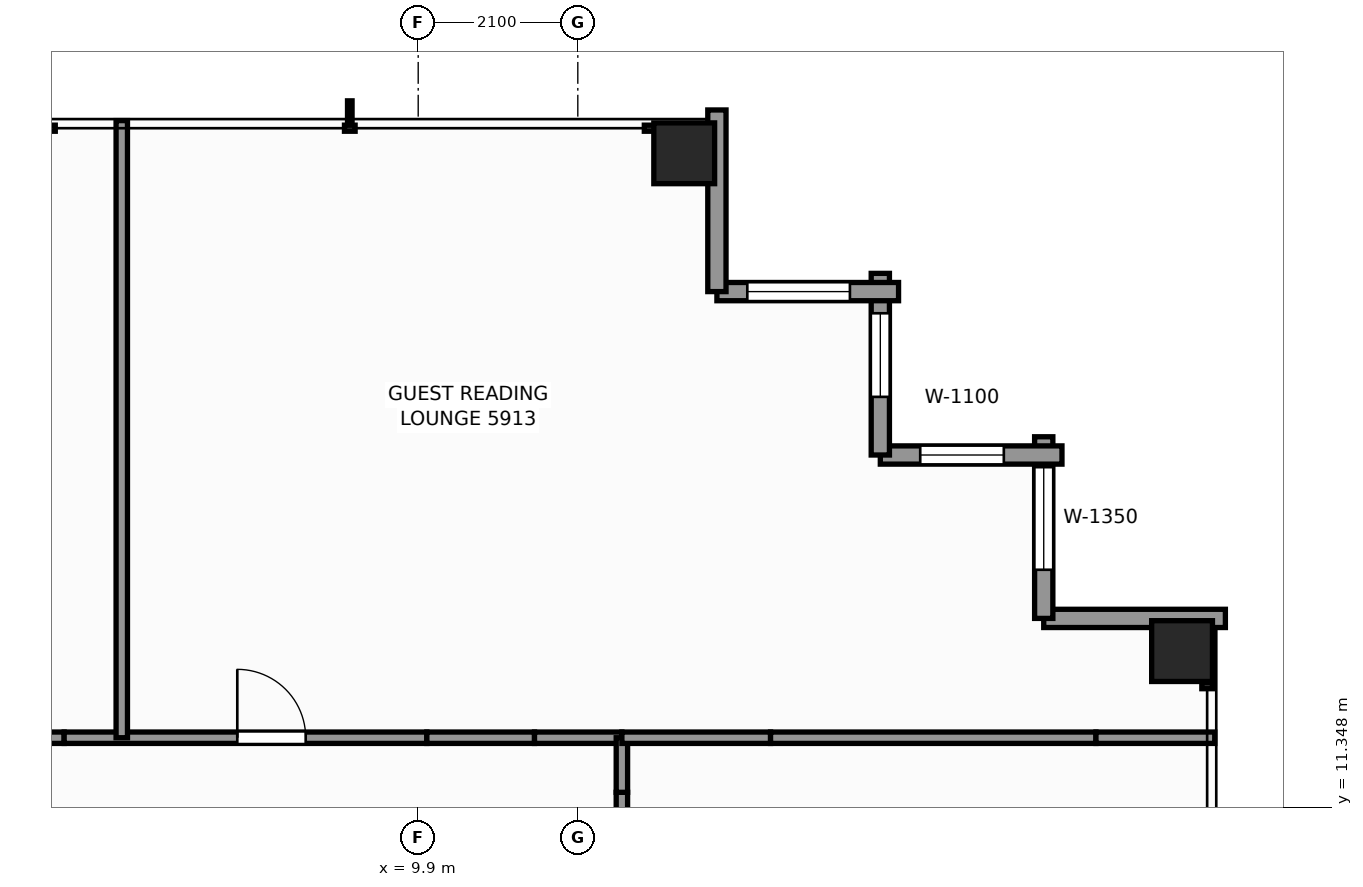
"""IFC4 building model, lengths in metres.
Left out: names, types, materials, properties, quantities, classifications, styles, units other than length and angle.
Written with IfcOpenShell. Run it as: python <this file> out.ifc"""

import sys

from ifc_helpers import new_model, si_unit, direction, frame, frame_2d, origin, origin_2d, place, context, subcontext, project, spatial, rectangle, extrude, element, fill, save


model = new_model("IFC4")
c1 = context("Model", 3, precision=1e-05, world=origin(), true_north=direction((0.0, 1.0)))
c2 = subcontext(c1, "Body", "Model", "MODEL_VIEW")
j1 = project(units=[si_unit("LENGTHUNIT", "METRE"), si_unit("PLANEANGLEUNIT", "RADIAN")], contexts=[c1])
p1 = place(None, origin())
s1 = spatial("IfcSite", under=j1, at=p1, CompositionType="ELEMENT")
p2 = place(p1, origin())
s2 = spatial("IfcBuilding", under=s1, at=p2, CompositionType="ELEMENT")
p3 = place(p2, frame((0.0, 0.0, 203.1)))
s3 = spatial("IfcBuildingStorey", under=s2, at=p3, CompositionType="ELEMENT", Elevation=203.1)
for number, where, z_axis, x_axis in (
    (1, (13.4, 19.95, 0.0), (0.0, 0.0, 1.0), (1.0, 0.0, 0.0)),
    (2, (19.95, 13.4, 0.0), (0.0, 0.0, 1.0), (1.0, 0.0, 0.0)),
):
    element("IfcColumn", number, at=place(p3, frame(where, z_axis=z_axis, x_axis=x_axis)), inside=s3, PredefinedType="COLUMN", context=c2, shape_type="SweptSolid", body=[
        extrude(rectangle(XDim=0.8, YDim=0.8, at=origin_2d()), origin(), (0.0, 0.0, 1.0), 3.3),
    ])
p4 = place(p3, frame((18.13, 13.83, 0.0), z_axis=(0.0, 0.0, 1.0), x_axis=(1.0, 0.0, 0.0)))
e3 = element("IfcWall", 3, at=p4, inside=s3, PredefinedType="STANDARD", context=c2, shape_type="SweptSolid", body=[
    extrude(rectangle(XDim=2.39, YDim=0.24, at=frame_2d((1.195, 0.0))), origin(), (0.0, 0.0, 1.0), 1.275),
])
p5 = place(p3, frame((18.13, 16.22, 0.0), z_axis=(0.0, 0.0, 1.0), x_axis=(0.0, -1.0, 0.0)))
e4 = element("IfcWall", 4, at=p5, inside=s3, PredefinedType="STANDARD", context=c2, shape_type="SweptSolid", body=[
    extrude(rectangle(XDim=2.39, YDim=0.24, at=frame_2d((1.195, 0.0))), origin(), (0.0, 0.0, 1.0), 2.463),
])
p6 = place(p5, frame((0.4, 0.0, 0.65)))
e5 = element("IfcOpeningElement", 5, at=p6, cuts=e4, PredefinedType="OPENING", context=c2, shape_type="SweptSolid", body=[
    extrude(rectangle(XDim=1.35, YDim=1.55, at=frame_2d((0.675, 0.775))), frame((0.0, 0.13, 0.0), z_axis=(0.0, -1.0, 0.0), x_axis=(1.0, 0.0, 0.0)), (0.0, 0.0, 1.0), 0.26),
])
p7 = place(p3, frame((15.98, 15.98, 0.0), z_axis=(0.0, 0.0, 1.0), x_axis=(1.0, 0.0, 0.0)))
e6 = element("IfcWall", 6, at=p7, inside=s3, PredefinedType="STANDARD", context=c2, shape_type="SweptSolid", body=[
    extrude(rectangle(XDim=2.39, YDim=0.24, at=frame_2d((1.195, 0.0))), origin(), (0.0, 0.0, 1.0), 2.463),
])
p8 = place(p7, frame((0.525, 0.0, 0.65)))
e7 = element("IfcOpeningElement", 7, at=p8, cuts=e6, PredefinedType="OPENING", context=c2, shape_type="SweptSolid", body=[
    extrude(rectangle(XDim=1.1, YDim=1.45, at=frame_2d((0.55, 0.725))), frame((0.0, 0.13, 0.0), z_axis=(0.0, -1.0, 0.0), x_axis=(1.0, 0.0, 0.0)), (0.0, 0.0, 1.0), 0.26),
])
p9 = place(p3, frame((15.98, 18.37, 0.0), z_axis=(0.0, 0.0, 1.0), x_axis=(0.0, -1.0, 0.0)))
e8 = element("IfcWall", 8, at=p9, inside=s3, PredefinedType="STANDARD", context=c2, shape_type="SweptSolid", body=[
    extrude(rectangle(XDim=2.39, YDim=0.24, at=frame_2d((1.195, 0.0))), origin(), (0.0, 0.0, 1.0), 2.463),
])
p10 = place(p9, frame((0.525, 0.0, 0.65)))
e9 = element("IfcOpeningElement", 9, at=p10, cuts=e8, PredefinedType="OPENING", context=c2, shape_type="SweptSolid", body=[
    extrude(rectangle(XDim=1.1, YDim=1.45, at=frame_2d((0.55, 0.725))), frame((0.0, 0.13, 0.0), z_axis=(0.0, -1.0, 0.0), x_axis=(1.0, 0.0, 0.0)), (0.0, 0.0, 1.0), 0.26),
])
p11 = place(p3, frame((13.83, 18.13, 0.0), z_axis=(0.0, 0.0, 1.0), x_axis=(1.0, 0.0, 0.0)))
e10 = element("IfcWall", 10, at=p11, inside=s3, PredefinedType="STANDARD", context=c2, shape_type="SweptSolid", body=[
    extrude(rectangle(XDim=2.39, YDim=0.24, at=frame_2d((1.195, 0.0))), origin(), (0.0, 0.0, 1.0), 2.463),
])
p12 = place(p11, frame((0.4, 0.0, 0.65)))
e11 = element("IfcOpeningElement", 11, at=p12, cuts=e10, PredefinedType="OPENING", context=c2, shape_type="SweptSolid", body=[
    extrude(rectangle(XDim=1.35, YDim=1.55, at=frame_2d((0.675, 0.775))), frame((0.0, 0.13, 0.0), z_axis=(0.0, -1.0, 0.0), x_axis=(1.0, 0.0, 0.0)), (0.0, 0.0, 1.0), 0.26),
])
p13 = place(p3, frame((13.83, 20.52, 0.0), z_axis=(0.0, 0.0, 1.0), x_axis=(0.0, -1.0, 0.0)))
e12 = element("IfcWall", 12, at=p13, inside=s3, PredefinedType="STANDARD", context=c2, shape_type="SweptSolid", body=[
    extrude(rectangle(XDim=2.39, YDim=0.24, at=frame_2d((1.195, 0.0))), origin(), (0.0, 0.0, 1.0), 1.275),
])
p14 = place(p3, frame((3.958, 12.26, 0.0), z_axis=(0.0, 0.0, 1.0), x_axis=(1.0, 0.0, 0.0)))
e13 = element("IfcWall", 13, at=p14, inside=s3, PredefinedType="PARTITIONING", context=c2, shape_type="SweptSolid", body=[
    extrude(rectangle(XDim=1.284, YDim=0.15, at=frame_2d((0.642, 0.0))), origin(), (0.0, 0.0, 1.0), 1.265),
])
p15 = place(p3, frame((5.242, 12.26, 0.0), z_axis=(0.0, 0.0, 1.0), x_axis=(1.0, 0.0, 0.0)))
e14 = element("IfcWall", 14, at=p15, inside=s3, PredefinedType="PARTITIONING", context=c2, shape_type="SweptSolid", body=[
    extrude(rectangle(XDim=4.772, YDim=0.15, at=frame_2d((2.386, 0.0))), origin(), (0.0, 0.0, 1.0), 3.08),
])
p16 = place(p15, frame((2.278, 0.0, 0.0)))
e15 = element("IfcOpeningElement", 15, at=p16, cuts=e14, PredefinedType="OPENING", context=c2, shape_type="SweptSolid", body=[
    extrude(rectangle(XDim=0.9, YDim=2.06, at=frame_2d((0.45, 1.03))), frame((0.0, 0.085, 0.0), z_axis=(0.0, -1.0, 0.0), x_axis=(1.0, 0.0, 0.0)), (0.0, 0.0, 1.0), 0.17),
])
p17 = place(p3, frame((10.014, 12.26, 0.0), z_axis=(0.0, 0.0, 1.0), x_axis=(1.0, 0.0, 0.0)))
e16 = element("IfcWall", 16, at=p17, inside=s3, PredefinedType="PARTITIONING", context=c2, shape_type="SweptSolid", body=[
    extrude(rectangle(XDim=1.417, YDim=0.15, at=frame_2d((0.708, 0.0))), origin(), (0.0, 0.0, 1.0), 1.265),
])
p18 = place(p3, frame((11.43, 12.26, 0.0), z_axis=(0.0, 0.0, 1.0), x_axis=(1.0, 0.0, 0.0)))
e17 = element("IfcWall", 17, at=p18, inside=s3, PredefinedType="PARTITIONING", context=c2, shape_type="SweptSolid", body=[
    extrude(rectangle(XDim=1.15, YDim=0.15, at=frame_2d((0.575, 0.0))), origin(), (0.0, 0.0, 1.0), 3.08),
])
p19 = place(p3, frame((12.58, 10.125, 0.0), z_axis=(0.0, 0.0, 1.0), x_axis=(0.0, 1.0, 0.0)))
e18 = element("IfcWall", 18, at=p19, inside=s3, PredefinedType="PARTITIONING", context=c2, shape_type="SweptSolid", body=[
    extrude(rectangle(XDim=1.417, YDim=0.15, at=frame_2d((0.708, 0.0))), origin(), (0.0, 0.0, 1.0), 1.265),
])
p20 = place(p3, frame((12.58, 11.542, 0.0), z_axis=(0.0, 0.0, 1.0), x_axis=(0.0, 1.0, 0.0)))
e19 = element("IfcWall", 19, at=p20, inside=s3, PredefinedType="PARTITIONING", context=c2, shape_type="SweptSolid", body=[
    extrude(rectangle(XDim=0.718, YDim=0.15, at=frame_2d((0.359, 0.0))), origin(), (0.0, 0.0, 1.0), 3.08),
])
p21 = place(p3, frame((12.58, 12.26, 0.0), z_axis=(0.0, 0.0, 1.0), x_axis=(1.0, 0.0, 0.0)))
e20 = element("IfcWall", 20, at=p21, inside=s3, PredefinedType="PARTITIONING", context=c2, shape_type="SweptSolid", body=[
    extrude(rectangle(XDim=1.956, YDim=0.15, at=frame_2d((0.978, 0.0))), origin(), (0.0, 0.0, 1.0), 3.08),
])
p22 = place(p3, frame((14.536, 12.26, 0.0), z_axis=(0.0, 0.0, 1.0), x_axis=(1.0, 0.0, 0.0)))
e21 = element("IfcWall", 21, at=p22, inside=s3, PredefinedType="PARTITIONING", context=c2, shape_type="SweptSolid", body=[
    extrude(rectangle(XDim=4.281, YDim=0.15, at=frame_2d((2.141, 0.0))), origin(), (0.0, 0.0, 1.0), 1.265),
])
p23 = place(p3, frame((18.817, 12.26, 0.0), z_axis=(0.0, 0.0, 1.0), x_axis=(1.0, 0.0, 0.0)))
e22 = element("IfcWall", 22, at=p23, inside=s3, PredefinedType="PARTITIONING", context=c2, shape_type="SweptSolid", body=[
    extrude(rectangle(XDim=1.563, YDim=0.15, at=frame_2d((0.781, 0.0))), origin(), (0.0, 0.0, 1.0), 2.453),
])
p24 = place(p3, frame((6.0, 12.26, 0.0), z_axis=(0.0, 0.0, 1.0), x_axis=(0.0, 1.0, 0.0)))
e23 = element("IfcWall", 23, at=p24, inside=s3, PredefinedType="PARTITIONING", context=c2, shape_type="SweptSolid", body=[
    extrude(rectangle(XDim=8.12, YDim=0.15, at=frame_2d((4.06, 0.0))), origin(), (0.0, 0.0, 1.0), 2.453),
])
p25 = place(p6, origin())
e24 = element("IfcWindow", 24, at=p25, inside=s3, PartitioningType="SINGLE_PANEL", PredefinedType="WINDOW", context=c2, shape_type="SweptSolid", body=[
    extrude(rectangle(XDim=1.35, YDim=1.55, at=frame_2d((0.675, 0.775))), frame((0.0, 0.03, 0.0), z_axis=(0.0, -1.0, 0.0), x_axis=(1.0, 0.0, 0.0)), (0.0, 0.0, 1.0), 0.06),
])
fill(e5, e24)
p26 = place(p8, origin())
e25 = element("IfcWindow", 25, at=p26, inside=s3, PartitioningType="SINGLE_PANEL", PredefinedType="WINDOW", context=c2, shape_type="SweptSolid", body=[
    extrude(rectangle(XDim=1.1, YDim=1.45, at=frame_2d((0.55, 0.725))), frame((0.0, 0.03, 0.0), z_axis=(0.0, -1.0, 0.0), x_axis=(1.0, 0.0, 0.0)), (0.0, 0.0, 1.0), 0.06),
])
fill(e7, e25)
p27 = place(p10, origin())
e26 = element("IfcWindow", 26, at=p27, inside=s3, PartitioningType="SINGLE_PANEL", PredefinedType="WINDOW", context=c2, shape_type="SweptSolid", body=[
    extrude(rectangle(XDim=1.1, YDim=1.45, at=frame_2d((0.55, 0.725))), frame((0.0, 0.03, 0.0), z_axis=(0.0, -1.0, 0.0), x_axis=(1.0, 0.0, 0.0)), (0.0, 0.0, 1.0), 0.06),
])
fill(e9, e26)
p28 = place(p12, origin())
e27 = element("IfcWindow", 27, at=p28, inside=s3, PartitioningType="SINGLE_PANEL", PredefinedType="WINDOW", context=c2, shape_type="SweptSolid", body=[
    extrude(rectangle(XDim=1.35, YDim=1.55, at=frame_2d((0.675, 0.775))), frame((0.0, 0.03, 0.0), z_axis=(0.0, -1.0, 0.0), x_axis=(1.0, 0.0, 0.0)), (0.0, 0.0, 1.0), 0.06),
])
fill(e11, e27)
p29 = place(p16, origin())
e28 = element("IfcDoor", 28, at=p29, inside=s3, OperationType="SINGLE_SWING_LEFT", PredefinedType="DOOR", context=c2, shape_type="SweptSolid", body=[
    extrude(rectangle(XDim=0.9, YDim=2.06, at=frame_2d((0.45, 1.03))), frame((0.0, 0.025, 0.0), z_axis=(0.0, -1.0, 0.0), x_axis=(1.0, 0.0, 0.0)), (0.0, 0.0, 1.0), 0.05),
])
fill(e15, e28)
save(model, sys.argv[1])
